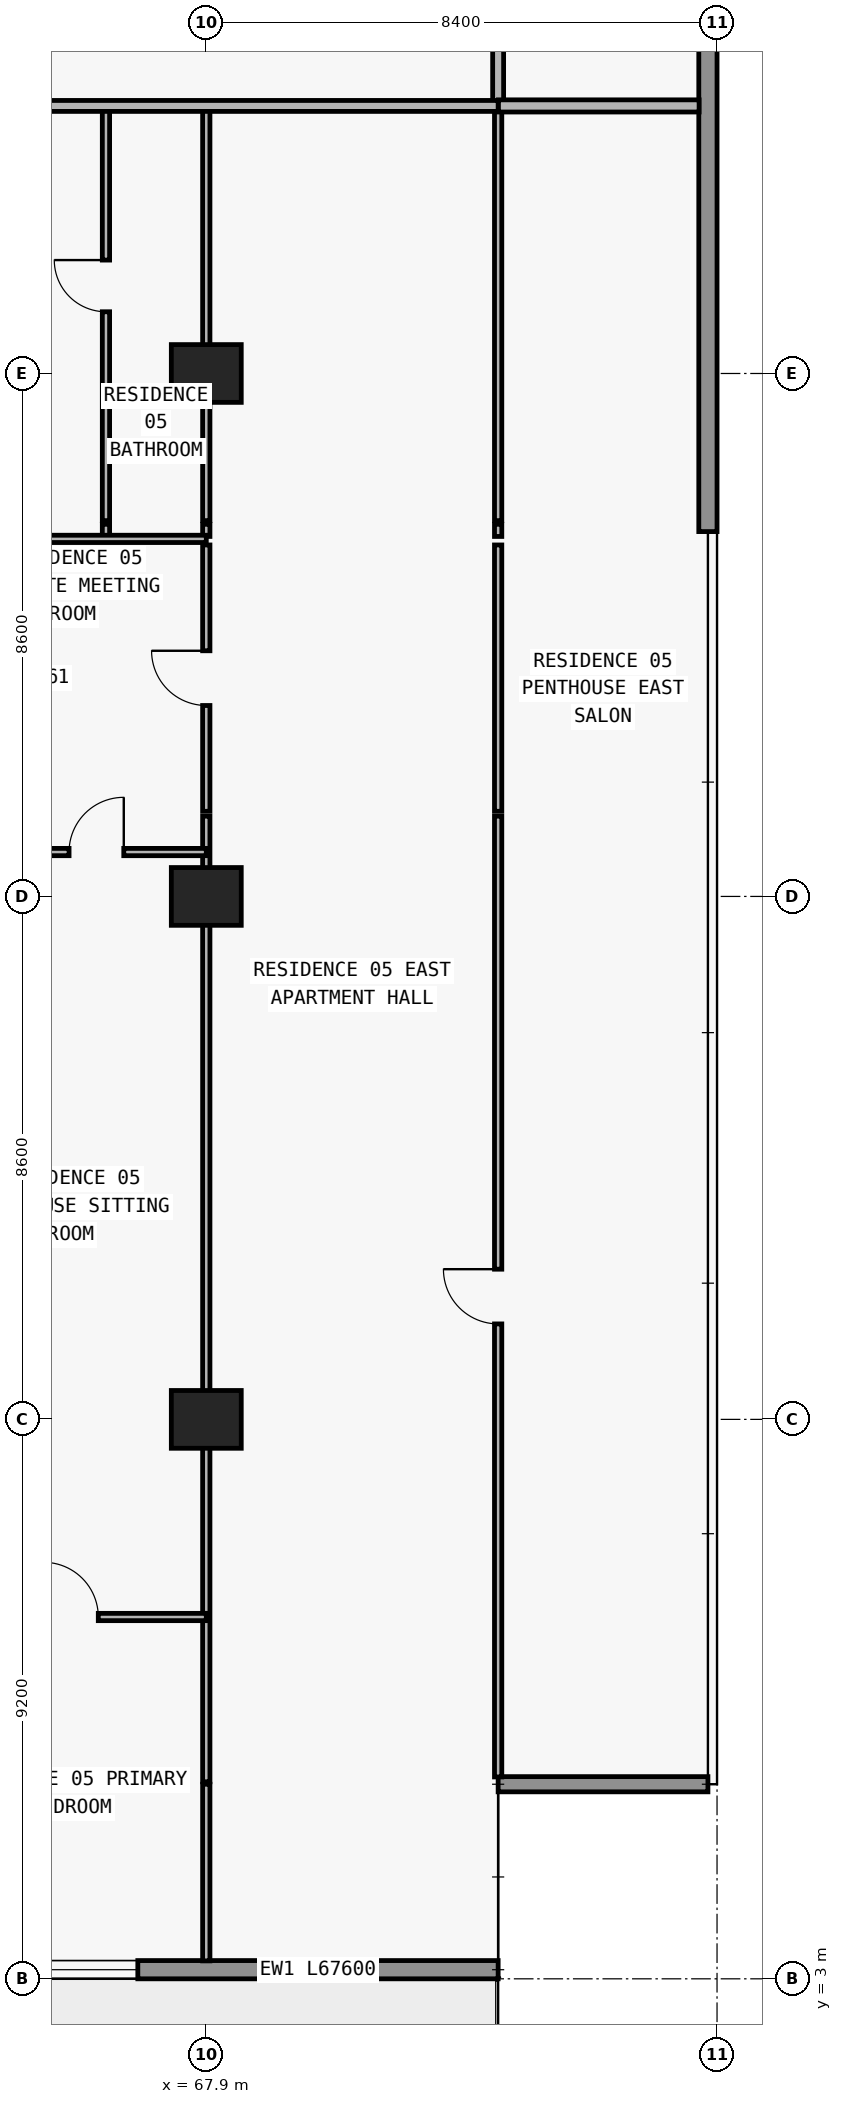
"""IFC4 building model, lengths in metres.
Left out: names, types, materials, properties, quantities, classifications, styles, units other than length and angle.
Written with IfcOpenShell. Run it as: python <this file> out.ifc"""

import sys

from ifc_helpers import new_model, si_unit, direction, frame, frame_2d, origin, origin_2d, place, context, subcontext, project, spatial, rectangle, extrude, element, fill, save


model = new_model("IFC4")
c1 = context("Model", 3, precision=1e-05, world=origin(), true_north=direction((0.0, 1.0)))
c2 = subcontext(c1, "Body", "Model", "MODEL_VIEW")
j1 = project(units=[si_unit("LENGTHUNIT", "METRE"), si_unit("PLANEANGLEUNIT", "RADIAN")], contexts=[c1])
p1 = place(None, origin())
s1 = spatial("IfcSite", under=j1, at=p1, CompositionType="ELEMENT")
p2 = place(p1, origin())
s2 = spatial("IfcBuilding", under=s1, at=p2, CompositionType="ELEMENT")
p3 = place(p2, frame((0.0, 0.0, 63.0)))
s3 = spatial("IfcBuildingStorey", under=s2, at=p3, CompositionType="ELEMENT", Elevation=63.0)
for number, where, z_axis, x_axis in (
    (1, (67.9, 12.2, 0.0), (0.0, 0.0, 1.0), (1.0, 0.0, 0.0)),
    (2, (67.9, 20.8, 0.0), (0.0, 0.0, 1.0), (1.0, 0.0, 0.0)),
    (3, (67.9, 29.4, 0.0), (0.0, 0.0, 1.0), (1.0, 0.0, 0.0)),
):
    element("IfcColumn", number, at=place(p3, frame(where, z_axis=z_axis, x_axis=x_axis)), inside=s3, PredefinedType="COLUMN", context=c2, shape_type="SweptSolid", body=[
        extrude(rectangle(XDim=1.15, YDim=0.95, at=origin_2d()), origin(), (0.0, 0.0, 1.0), 3.05),
    ])
p4 = place(p3, frame((72.7, 3.15, 0.0), z_axis=(0.0, 0.0, 1.0), x_axis=(-1.0, 0.0, 0.0)))
e4 = element("IfcWall", 4, at=p4, inside=s3, PredefinedType="STANDARD", context=c2, shape_type="SweptSolid", body=[
    extrude(rectangle(XDim=67.6, YDim=0.3, at=frame_2d((33.8, 0.0))), origin(), (0.0, 0.0, 1.0), 3.05),
])
p5 = place(p4, frame((59.89, 0.0, 0.0)))
e5 = element("IfcOpeningElement", 5, at=p5, cuts=e4, PredefinedType="OPENING", context=c2, shape_type="SweptSolid", body=[
    extrude(rectangle(XDim=2.0, YDim=2.3, at=frame_2d((1.0, 1.15))), frame((0.0, 0.16, 0.0), z_axis=(0.0, -1.0, 0.0), x_axis=(1.0, 0.0, 0.0)), (0.0, 0.0, 1.0), 0.32),
])
p6 = place(p4, frame((55.21, 0.0, 0.65)))
e6 = element("IfcOpeningElement", 6, at=p6, cuts=e4, PredefinedType="OPENING", context=c2, shape_type="SweptSolid", body=[
    extrude(rectangle(XDim=2.6, YDim=1.85, at=frame_2d((1.3, 0.925))), frame((0.0, 0.16, 0.0), z_axis=(0.0, -1.0, 0.0), x_axis=(1.0, 0.0, 0.0)), (0.0, 0.0, 1.0), 0.32),
])
p7 = place(p4, frame((49.1, 0.0, 0.85)))
e7 = element("IfcOpeningElement", 7, at=p7, cuts=e4, PredefinedType="OPENING", context=c2, shape_type="SweptSolid", body=[
    extrude(rectangle(XDim=2.2, YDim=1.55, at=frame_2d((1.1, 0.775))), frame((0.0, 0.16, 0.0), z_axis=(0.0, -1.0, 0.0), x_axis=(1.0, 0.0, 0.0)), (0.0, 0.0, 1.0), 0.32),
])
p8 = place(p4, frame((43.09, 0.0, 0.0)))
e8 = element("IfcOpeningElement", 8, at=p8, cuts=e4, PredefinedType="OPENING", context=c2, shape_type="SweptSolid", body=[
    extrude(rectangle(XDim=2.0, YDim=2.3, at=frame_2d((1.0, 1.15))), frame((0.0, 0.16, 0.0), z_axis=(0.0, -1.0, 0.0), x_axis=(1.0, 0.0, 0.0)), (0.0, 0.0, 1.0), 0.32),
])
p9 = place(p4, frame((38.41, 0.0, 0.65)))
e9 = element("IfcOpeningElement", 9, at=p9, cuts=e4, PredefinedType="OPENING", context=c2, shape_type="SweptSolid", body=[
    extrude(rectangle(XDim=2.6, YDim=1.85, at=frame_2d((1.3, 0.925))), frame((0.0, 0.16, 0.0), z_axis=(0.0, -1.0, 0.0), x_axis=(1.0, 0.0, 0.0)), (0.0, 0.0, 1.0), 0.32),
])
p10 = place(p4, frame((32.7, 0.0, 0.85)))
e10 = element("IfcOpeningElement", 10, at=p10, cuts=e4, PredefinedType="OPENING", context=c2, shape_type="SweptSolid", body=[
    extrude(rectangle(XDim=2.2, YDim=1.55, at=frame_2d((1.1, 0.775))), frame((0.0, 0.16, 0.0), z_axis=(0.0, -1.0, 0.0), x_axis=(1.0, 0.0, 0.0)), (0.0, 0.0, 1.0), 0.32),
])
p11 = place(p4, frame((27.026, 0.0, 0.0)))
e11 = element("IfcOpeningElement", 11, at=p11, cuts=e4, PredefinedType="OPENING", context=c2, shape_type="SweptSolid", body=[
    extrude(rectangle(XDim=2.0, YDim=2.3, at=frame_2d((1.0, 1.15))), frame((0.0, 0.16, 0.0), z_axis=(0.0, -1.0, 0.0), x_axis=(1.0, 0.0, 0.0)), (0.0, 0.0, 1.0), 0.32),
])
p12 = place(p4, frame((22.726, 0.0, 0.85)))
e12 = element("IfcOpeningElement", 12, at=p12, cuts=e4, PredefinedType="OPENING", context=c2, shape_type="SweptSolid", body=[
    extrude(rectangle(XDim=2.2, YDim=1.55, at=frame_2d((1.1, 0.775))), frame((0.0, 0.16, 0.0), z_axis=(0.0, -1.0, 0.0), x_axis=(1.0, 0.0, 0.0)), (0.0, 0.0, 1.0), 0.32),
])
p13 = place(p4, frame((18.29, 0.0, 0.0)))
e13 = element("IfcOpeningElement", 13, at=p13, cuts=e4, PredefinedType="OPENING", context=c2, shape_type="SweptSolid", body=[
    extrude(rectangle(XDim=2.0, YDim=2.3, at=frame_2d((1.0, 1.15))), frame((0.0, 0.16, 0.0), z_axis=(0.0, -1.0, 0.0), x_axis=(1.0, 0.0, 0.0)), (0.0, 0.0, 1.0), 0.32),
])
p14 = place(p4, frame((14.19, 0.0, 0.85)))
e14 = element("IfcOpeningElement", 14, at=p14, cuts=e4, PredefinedType="OPENING", context=c2, shape_type="SweptSolid", body=[
    extrude(rectangle(XDim=1.8, YDim=1.55, at=frame_2d((0.9, 0.775))), frame((0.0, 0.16, 0.0), z_axis=(0.0, -1.0, 0.0), x_axis=(1.0, 0.0, 0.0)), (0.0, 0.0, 1.0), 0.32),
])
p15 = place(p4, frame((10.226, 0.0, 0.0)))
e15 = element("IfcOpeningElement", 15, at=p15, cuts=e4, PredefinedType="OPENING", context=c2, shape_type="SweptSolid", body=[
    extrude(rectangle(XDim=2.0, YDim=2.3, at=frame_2d((1.0, 1.15))), frame((0.0, 0.16, 0.0), z_axis=(0.0, -1.0, 0.0), x_axis=(1.0, 0.0, 0.0)), (0.0, 0.0, 1.0), 0.32),
])
p16 = place(p4, frame((5.926, 0.0, 0.85)))
e16 = element("IfcOpeningElement", 16, at=p16, cuts=e4, PredefinedType="OPENING", context=c2, shape_type="SweptSolid", body=[
    extrude(rectangle(XDim=2.2, YDim=1.55, at=frame_2d((1.1, 0.775))), frame((0.0, 0.16, 0.0), z_axis=(0.0, -1.0, 0.0), x_axis=(1.0, 0.0, 0.0)), (0.0, 0.0, 1.0), 0.32),
])
p17 = place(p3, frame((72.7, 6.2, 0.0), z_axis=(0.0, 0.0, 1.0), x_axis=(1.0, 0.0, 0.0)))
e17 = element("IfcWall", 17, at=p17, inside=s3, PredefinedType="ELEMENTEDWALL", context=c2, shape_type="SweptSolid", body=[
    extrude(rectangle(XDim=3.45, YDim=0.25, at=frame_2d((1.725, 0.0))), origin(), (0.0, 0.0, 1.0), 3.05),
])
p18 = place(p3, frame((76.15, 47.4, 0.0), z_axis=(0.0, 0.0, 1.0), x_axis=(0.0, -1.0, 0.0)))
e18 = element("IfcWall", 18, at=p18, inside=s3, PredefinedType="STANDARD", context=c2, shape_type="SweptSolid", body=[
    extrude(rectangle(XDim=20.6, YDim=0.3, at=frame_2d((10.3, 0.0))), origin(), (0.0, 0.0, 1.0), 3.05),
])
p19 = place(p3, frame((66.25, 26.72, 0.0), z_axis=(0.0, 0.0, 1.0), x_axis=(0.0, 1.0, 0.0)))
e19 = element("IfcWall", 19, at=p19, inside=s3, PredefinedType="PARTITIONING", context=c2, shape_type="SweptSolid", body=[
    extrude(rectangle(XDim=0.2, YDim=0.12, at=frame_2d((0.1, 0.0))), origin(), (0.0, 0.0, 1.0), 3.05),
])
p20 = place(p3, frame((66.25, 26.98, 0.0), z_axis=(0.0, 0.0, 1.0), x_axis=(0.0, 1.0, 0.0)))
e20 = element("IfcWall", 20, at=p20, inside=s3, PredefinedType="PARTITIONING", context=c2, shape_type="SweptSolid", body=[
    extrude(rectangle(XDim=6.82, YDim=0.12, at=frame_2d((3.41, 0.0))), origin(), (0.0, 0.0, 1.0), 3.05),
])
p21 = place(p20, frame((3.435, 0.0, 0.0)))
e21 = element("IfcOpeningElement", 21, at=p21, cuts=e20, PredefinedType="OPENING", context=c2, shape_type="SweptSolid", body=[
    extrude(rectangle(XDim=0.85, YDim=2.1, at=frame_2d((0.425, 1.05))), frame((0.0, 0.07, 0.0), z_axis=(0.0, -1.0, 0.0), x_axis=(1.0, 0.0, 0.0)), (0.0, 0.0, 1.0), 0.14),
])
p22 = place(p3, frame((67.9, 3.295, 0.0), z_axis=(0.0, 0.0, 1.0), x_axis=(0.0, 1.0, 0.0)))
e22 = element("IfcWall", 22, at=p22, inside=s3, PredefinedType="PARTITIONING", context=c2, shape_type="SweptSolid", body=[
    extrude(rectangle(XDim=2.905, YDim=0.12, at=frame_2d((1.453, 0.0))), origin(), (0.0, 0.0, 1.0), 3.05),
])
p23 = place(p3, frame((67.9, 6.24, 0.0), z_axis=(0.0, 0.0, 1.0), x_axis=(0.0, 1.0, 0.0)))
e23 = element("IfcWall", 23, at=p23, inside=s3, PredefinedType="PARTITIONING", context=c2, shape_type="SweptSolid", body=[
    extrude(rectangle(XDim=15.88, YDim=0.12, at=frame_2d((7.94, 0.0))), origin(), (0.0, 0.0, 1.0), 2.11),
])
p24 = place(p3, frame((67.9, 22.2, 0.0), z_axis=(0.0, 0.0, 1.0), x_axis=(0.0, 1.0, 0.0)))
e24 = element("IfcWall", 24, at=p24, inside=s3, PredefinedType="PARTITIONING", context=c2, shape_type="SweptSolid", body=[
    extrude(rectangle(XDim=4.38, YDim=0.12, at=frame_2d((2.19, 0.0))), origin(), (0.0, 0.0, 1.0), 2.11),
])
p25 = place(p24, frame((1.74, 0.0, 0.0)))
e25 = element("IfcOpeningElement", 25, at=p25, cuts=e24, PredefinedType="OPENING", context=c2, shape_type="SweptSolid", body=[
    extrude(rectangle(XDim=0.9, YDim=2.06, at=frame_2d((0.45, 1.03))), frame((0.0, 0.07, 0.0), z_axis=(0.0, -1.0, 0.0), x_axis=(1.0, 0.0, 0.0)), (0.0, 0.0, 1.0), 0.14),
])
p26 = place(p3, frame((67.9, 26.72, 0.0), z_axis=(0.0, 0.0, 1.0), x_axis=(0.0, 1.0, 0.0)))
e26 = element("IfcWall", 26, at=p26, inside=s3, PredefinedType="PARTITIONING", context=c2, shape_type="SweptSolid", body=[
    extrude(rectangle(XDim=0.2, YDim=0.12, at=frame_2d((0.1, 0.0))), origin(), (0.0, 0.0, 1.0), 2.11),
])
p27 = place(p3, frame((67.9, 26.98, 0.0), z_axis=(0.0, 0.0, 1.0), x_axis=(0.0, 1.0, 0.0)))
e27 = element("IfcWall", 27, at=p27, inside=s3, PredefinedType="PARTITIONING", context=c2, shape_type="SweptSolid", body=[
    extrude(rectangle(XDim=6.82, YDim=0.12, at=frame_2d((3.41, 0.0))), origin(), (0.0, 0.0, 1.0), 2.11),
])
p28 = place(p3, frame((72.7, 6.32, 0.0), z_axis=(0.0, 0.0, 1.0), x_axis=(0.0, 1.0, 0.0)))
e28 = element("IfcWall", 28, at=p28, inside=s3, PredefinedType="PARTITIONING", context=c2, shape_type="SweptSolid", body=[
    extrude(rectangle(XDim=15.8, YDim=0.12, at=frame_2d((7.9, 0.0))), origin(), (0.0, 0.0, 1.0), 3.05),
])
p29 = place(p28, frame((7.45, 0.0, 0.0)))
e29 = element("IfcOpeningElement", 29, at=p29, cuts=e28, PredefinedType="OPENING", context=c2, shape_type="SweptSolid", body=[
    extrude(rectangle(XDim=0.9, YDim=2.15, at=frame_2d((0.45, 1.075))), frame((0.0, 0.07, 0.0), z_axis=(0.0, -1.0, 0.0), x_axis=(1.0, 0.0, 0.0)), (0.0, 0.0, 1.0), 0.14),
])
p30 = place(p3, frame((72.7, 22.2, 0.0), z_axis=(0.0, 0.0, 1.0), x_axis=(0.0, 1.0, 0.0)))
e30 = element("IfcWall", 30, at=p30, inside=s3, PredefinedType="PARTITIONING", context=c2, shape_type="SweptSolid", body=[
    extrude(rectangle(XDim=4.38, YDim=0.12, at=frame_2d((2.19, 0.0))), origin(), (0.0, 0.0, 1.0), 3.05),
])
p31 = place(p3, frame((72.7, 26.72, 0.0), z_axis=(0.0, 0.0, 1.0), x_axis=(0.0, 1.0, 0.0)))
e31 = element("IfcWall", 31, at=p31, inside=s3, PredefinedType="PARTITIONING", context=c2, shape_type="SweptSolid", body=[
    extrude(rectangle(XDim=0.2, YDim=0.12, at=frame_2d((0.1, 0.0))), origin(), (0.0, 0.0, 1.0), 3.05),
])
p32 = place(p3, frame((72.7, 26.98, 0.0), z_axis=(0.0, 0.0, 1.0), x_axis=(0.0, 1.0, 0.0)))
e32 = element("IfcWall", 32, at=p32, inside=s3, PredefinedType="PARTITIONING", context=c2, shape_type="SweptSolid", body=[
    extrude(rectangle(XDim=6.82, YDim=0.12, at=frame_2d((3.41, 0.0))), origin(), (0.0, 0.0, 1.0), 3.05),
])
p33 = place(p3, frame((72.7, 33.805, 0.0), z_axis=(0.0, 0.0, 1.0), x_axis=(0.0, 1.0, 0.0)))
e33 = element("IfcWall", 33, at=p33, inside=s3, PredefinedType="PARTITIONING", context=c2, shape_type="SweptSolid", body=[
    extrude(rectangle(XDim=3.095, YDim=0.18, at=frame_2d((1.547, 0.0))), origin(), (0.0, 0.0, 1.0), 3.05),
])
p34 = place(p3, frame((63.448, 8.95, 0.0), z_axis=(0.0, 0.0, 1.0), x_axis=(1.0, 0.0, 0.0)))
e34 = element("IfcWall", 34, at=p34, inside=s3, PredefinedType="PARTITIONING", context=c2, shape_type="SweptSolid", body=[
    extrude(rectangle(XDim=4.452, YDim=0.12, at=frame_2d((2.226, 0.0))), origin(), (0.0, 0.0, 1.0), 3.05),
])
p35 = place(p34, frame((1.776, 0.0, 0.0)))
e35 = element("IfcOpeningElement", 35, at=p35, cuts=e34, PredefinedType="OPENING", context=c2, shape_type="SweptSolid", body=[
    extrude(rectangle(XDim=0.9, YDim=2.15, at=frame_2d((0.45, 1.075))), frame((0.0, 0.07, 0.0), z_axis=(0.0, -1.0, 0.0), x_axis=(1.0, 0.0, 0.0)), (0.0, 0.0, 1.0), 0.14),
])
p36 = place(p3, frame((59.5, 21.53, 0.0), z_axis=(0.0, 0.0, 1.0), x_axis=(1.0, 0.0, 0.0)))
e36 = element("IfcWall", 36, at=p36, inside=s3, PredefinedType="PARTITIONING", context=c2, shape_type="SweptSolid", body=[
    extrude(rectangle(XDim=8.4, YDim=0.12, at=frame_2d((4.2, 0.0))), origin(), (0.0, 0.0, 1.0), 3.05),
])
p37 = place(p36, frame((1.524, 0.0, 0.0)))
e37 = element("IfcOpeningElement", 37, at=p37, cuts=e36, PredefinedType="OPENING", context=c2, shape_type="SweptSolid", body=[
    extrude(rectangle(XDim=0.9, YDim=2.15, at=frame_2d((0.45, 1.075))), frame((0.0, 0.07, 0.0), z_axis=(0.0, -1.0, 0.0), x_axis=(1.0, 0.0, 0.0)), (0.0, 0.0, 1.0), 0.14),
])
p38 = place(p36, frame((6.143, 0.0, 0.0)))
e38 = element("IfcOpeningElement", 38, at=p38, cuts=e36, PredefinedType="OPENING", context=c2, shape_type="SweptSolid", body=[
    extrude(rectangle(XDim=0.9, YDim=2.15, at=frame_2d((0.45, 1.075))), frame((0.0, 0.07, 0.0), z_axis=(0.0, -1.0, 0.0), x_axis=(1.0, 0.0, 0.0)), (0.0, 0.0, 1.0), 0.14),
])
p39 = place(p3, frame((59.5, 26.68, 0.0), z_axis=(0.0, 0.0, 1.0), x_axis=(1.0, 0.0, 0.0)))
e39 = element("IfcWall", 39, at=p39, inside=s3, PredefinedType="PARTITIONING", context=c2, shape_type="SweptSolid", body=[
    extrude(rectangle(XDim=8.4, YDim=0.12, at=frame_2d((4.2, 0.0))), origin(), (0.0, 0.0, 1.0), 3.05),
])
p40 = place(p39, frame((1.943, 0.0, 0.0)))
e40 = element("IfcOpeningElement", 40, at=p40, cuts=e39, PredefinedType="OPENING", context=c2, shape_type="SweptSolid", body=[
    extrude(rectangle(XDim=0.9, YDim=2.15, at=frame_2d((0.45, 1.075))), frame((0.0, 0.07, 0.0), z_axis=(0.0, -1.0, 0.0), x_axis=(1.0, 0.0, 0.0)), (0.0, 0.0, 1.0), 0.14),
])
p41 = place(p3, frame((26.7, 33.8, 0.0), z_axis=(0.0, 0.0, 1.0), x_axis=(1.0, 0.0, 0.0)))
e41 = element("IfcWall", 41, at=p41, inside=s3, PredefinedType="PARTITIONING", context=c2, shape_type="SweptSolid", body=[
    extrude(rectangle(XDim=46.0, YDim=0.18, at=frame_2d((23.0, 0.0))), origin(), (0.0, 0.0, 1.0), 3.05),
])
p42 = place(p41, frame((2.95, 0.0, 0.0)))
e42 = element("IfcOpeningElement", 42, at=p42, cuts=e41, PredefinedType="OPENING", context=c2, shape_type="SweptSolid", body=[
    extrude(rectangle(XDim=1.0, YDim=2.2, at=frame_2d((0.5, 1.1))), frame((0.0, 0.1, 0.0), z_axis=(0.0, -1.0, 0.0), x_axis=(1.0, 0.0, 0.0)), (0.0, 0.0, 1.0), 0.2),
])
p43 = place(p41, frame((18.875, 0.0, 0.0)))
e43 = element("IfcOpeningElement", 43, at=p43, cuts=e41, PredefinedType="OPENING", context=c2, shape_type="SweptSolid", body=[
    extrude(rectangle(XDim=1.0, YDim=2.2, at=frame_2d((0.5, 1.1))), frame((0.0, 0.1, 0.0), z_axis=(0.0, -1.0, 0.0), x_axis=(1.0, 0.0, 0.0)), (0.0, 0.0, 1.0), 0.2),
])
p44 = place(p41, frame((27.275, 0.0, 0.0)))
e44 = element("IfcOpeningElement", 44, at=p44, cuts=e41, PredefinedType="OPENING", context=c2, shape_type="SweptSolid", body=[
    extrude(rectangle(XDim=1.0, YDim=2.2, at=frame_2d((0.5, 1.1))), frame((0.0, 0.1, 0.0), z_axis=(0.0, -1.0, 0.0), x_axis=(1.0, 0.0, 0.0)), (0.0, 0.0, 1.0), 0.2),
])
p45 = place(p41, frame((35.675, 0.0, 0.0)))
e45 = element("IfcOpeningElement", 45, at=p45, cuts=e41, PredefinedType="OPENING", context=c2, shape_type="SweptSolid", body=[
    extrude(rectangle(XDim=1.0, YDim=2.2, at=frame_2d((0.5, 1.1))), frame((0.0, 0.1, 0.0), z_axis=(0.0, -1.0, 0.0), x_axis=(1.0, 0.0, 0.0)), (0.0, 0.0, 1.0), 0.2),
])
p46 = place(p3, frame((72.705, 33.8, 0.0), z_axis=(0.0, 0.0, 1.0), x_axis=(1.0, 0.0, 0.0)))
e46 = element("IfcWall", 46, at=p46, inside=s3, PredefinedType="PARTITIONING", context=c2, shape_type="SweptSolid", body=[
    extrude(rectangle(XDim=3.3, YDim=0.2, at=frame_2d((1.65, 0.0))), origin(), (0.0, 0.0, 1.0), 3.05),
])
p47 = place(p16, origin())
e47 = element("IfcWindow", 47, at=p47, inside=s3, PartitioningType="SINGLE_PANEL", PredefinedType="WINDOW", context=c2, shape_type="SweptSolid", body=[
    extrude(rectangle(XDim=2.2, YDim=1.55, at=frame_2d((1.1, 0.775))), frame((0.0, 0.03, 0.0), z_axis=(0.0, -1.0, 0.0), x_axis=(1.0, 0.0, 0.0)), (0.0, 0.0, 1.0), 0.06),
])
fill(e16, e47)
p48 = place(p21, origin())
e48 = element("IfcDoor", 48, at=p48, inside=s3, OperationType="SINGLE_SWING_RIGHT", PredefinedType="DOOR", context=c2, shape_type="SweptSolid", body=[
    extrude(rectangle(XDim=0.85, YDim=2.1, at=frame_2d((0.425, 1.05))), frame((0.0, 0.025, 0.0), z_axis=(0.0, -1.0, 0.0), x_axis=(1.0, 0.0, 0.0)), (0.0, 0.0, 1.0), 0.05),
])
fill(e21, e48)
p49 = place(p38, origin())
e49 = element("IfcDoor", 49, at=p49, inside=s3, OperationType="SINGLE_SWING_RIGHT", PredefinedType="DOOR", context=c2, shape_type="SweptSolid", body=[
    extrude(rectangle(XDim=0.9, YDim=2.15, at=frame_2d((0.45, 1.075))), frame((0.0, 0.025, 0.0), z_axis=(0.0, -1.0, 0.0), x_axis=(1.0, 0.0, 0.0)), (0.0, 0.0, 1.0), 0.05),
])
fill(e38, e49)
p50 = place(p35, origin())
e50 = element("IfcDoor", 50, at=p50, inside=s3, OperationType="SINGLE_SWING_LEFT", PredefinedType="DOOR", context=c2, shape_type="SweptSolid", body=[
    extrude(rectangle(XDim=0.9, YDim=2.15, at=frame_2d((0.45, 1.075))), frame((0.0, 0.025, 0.0), z_axis=(0.0, -1.0, 0.0), x_axis=(1.0, 0.0, 0.0)), (0.0, 0.0, 1.0), 0.05),
])
fill(e35, e50)
p51 = place(p25, origin())
e51 = element("IfcDoor", 51, at=p51, inside=s3, OperationType="SINGLE_SWING_RIGHT", PredefinedType="DOOR", context=c2, shape_type="SweptSolid", body=[
    extrude(rectangle(XDim=0.9, YDim=2.06, at=frame_2d((0.45, 1.03))), frame((0.0, 0.025, 0.0), z_axis=(0.0, -1.0, 0.0), x_axis=(1.0, 0.0, 0.0)), (0.0, 0.0, 1.0), 0.05),
])
fill(e25, e51)
p52 = place(p29, origin())
e52 = element("IfcDoor", 52, at=p52, inside=s3, OperationType="SINGLE_SWING_RIGHT", PredefinedType="DOOR", context=c2, shape_type="SweptSolid", body=[
    extrude(rectangle(XDim=0.9, YDim=2.15, at=frame_2d((0.45, 1.075))), frame((0.0, 0.025, 0.0), z_axis=(0.0, -1.0, 0.0), x_axis=(1.0, 0.0, 0.0)), (0.0, 0.0, 1.0), 0.05),
])
fill(e29, e52)
save(model, sys.argv[1])
